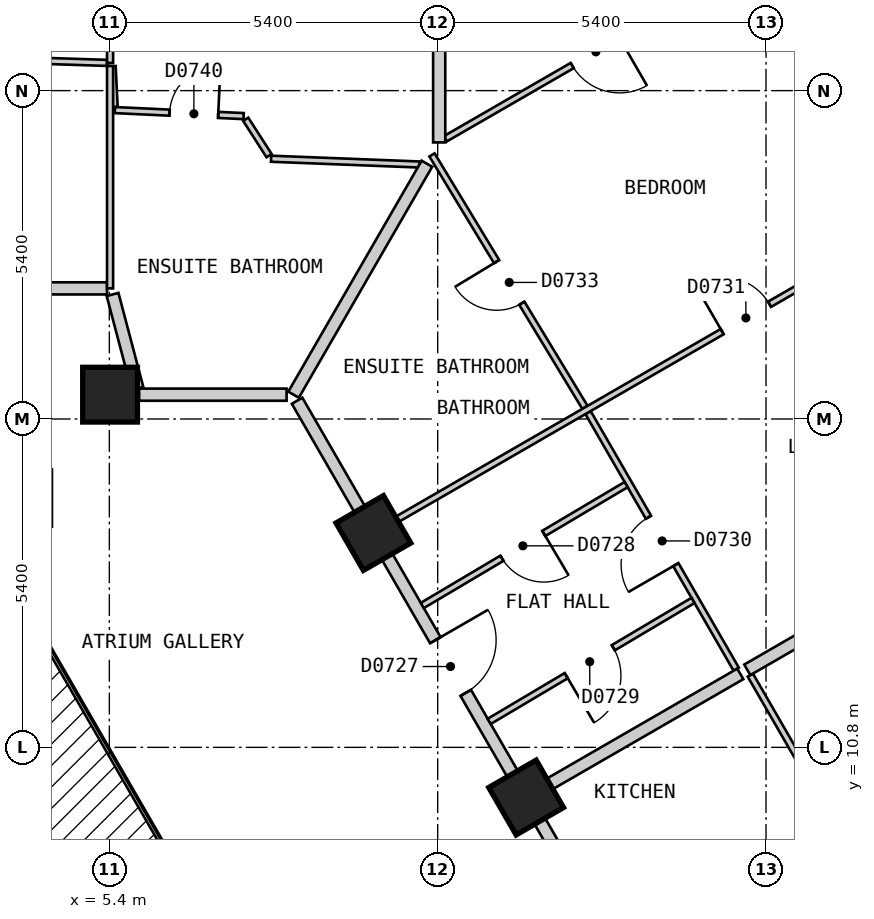
"""IFC4 building model, lengths in metres.
Left out: names, types, materials, properties, quantities, classifications, styles, units other than length and angle.
Written with IfcOpenShell. Run it as: python <this file> out.ifc"""

import sys

from ifc_helpers import new_model, si_unit, direction, frame, frame_2d, origin, origin_2d, place, context, subcontext, project, spatial, polyline, rectangle, outline, extrude, element, fill, save


model = new_model("IFC4")
c1 = context("Model", 3, precision=1e-05, world=origin(), true_north=direction((0.0, 1.0)))
c2 = subcontext(c1, "Body", "Model", "MODEL_VIEW")
j1 = project(units=[si_unit("LENGTHUNIT", "METRE"), si_unit("PLANEANGLEUNIT", "RADIAN")], contexts=[c1])
p1 = place(None, origin())
s1 = spatial("IfcSite", under=j1, at=p1, CompositionType="ELEMENT")
p2 = place(p1, origin())
s2 = spatial("IfcBuilding", under=s1, at=p2, CompositionType="ELEMENT")
p3 = place(p2, frame((0.0, 0.0, 93.0)))
s3 = spatial("IfcBuildingStorey", under=s2, at=p3, CompositionType="ELEMENT", Elevation=93.0)
for number, where, z_axis, x_axis in (
    (1, (12.255, 9.975, 0.0), (0.0, 0.0, 1.0), (-0.5, 0.866, 0.0)),
    (2, (9.743, 14.325, 0.0), (0.0, 0.0, 1.0), (-0.5, 0.866, 0.0)),
    (3, (5.412, 16.6, 0.0), (0.0, 0.0, 1.0), (-1.0, 0.0, 0.0)),
):
    element("IfcColumn", number, at=place(p3, frame(where, z_axis=z_axis, x_axis=x_axis)), inside=s3, PredefinedType="COLUMN", context=c2, shape_type="SweptSolid", body=[
        extrude(rectangle(XDim=0.9, YDim=0.9, at=origin_2d()), origin(), (0.0, 0.0, 1.0), 3.0),
    ])
p4 = place(p3, frame((29.027, 1.425, 0.0), z_axis=(0.0, 0.0, 1.0), x_axis=(-0.500027479704, 0.866009537788, 0.0)))
e4 = element("IfcWall", 4, at=p4, inside=s3, PredefinedType="SOLIDWALL", context=c2, shape_type="SweptSolid", body=[
    extrude(outline(polyline([(0.0, -0.15), (26.559, -0.15), (26.478, 0.15), (0.08, 0.15), (0.0, -0.15)])), origin(), (0.0, 0.0, 1.0), 2.7),
])
p5 = place(p4, frame((1.227, 0.0, 0.15)))
e5 = element("IfcOpeningElement", 5, at=p5, cuts=e4, PredefinedType="OPENING", context=c2, shape_type="SweptSolid", body=[
    extrude(rectangle(XDim=1.5, YDim=2.1, at=frame_2d((0.75, 1.05))), frame((0.0, 0.16, 0.0), z_axis=(0.0, -1.0, 0.0), x_axis=(1.0, 0.0, 0.0)), (0.0, 0.0, 1.0), 0.32),
])
p6 = place(p4, frame((3.738, 0.0, 0.15)))
e6 = element("IfcOpeningElement", 6, at=p6, cuts=e4, PredefinedType="OPENING", context=c2, shape_type="SweptSolid", body=[
    extrude(rectangle(XDim=1.5, YDim=2.1, at=frame_2d((0.75, 1.05))), frame((0.0, 0.16, 0.0), z_axis=(0.0, -1.0, 0.0), x_axis=(1.0, 0.0, 0.0)), (0.0, 0.0, 1.0), 0.32),
])
p7 = place(p4, frame((6.25, 0.0, 0.15)))
e7 = element("IfcOpeningElement", 7, at=p7, cuts=e4, PredefinedType="OPENING", context=c2, shape_type="SweptSolid", body=[
    extrude(rectangle(XDim=1.5, YDim=2.1, at=frame_2d((0.75, 1.05))), frame((0.0, 0.16, 0.0), z_axis=(0.0, -1.0, 0.0), x_axis=(1.0, 0.0, 0.0)), (0.0, 0.0, 1.0), 0.32),
])
p8 = place(p4, frame((8.761, 0.0, 0.15)))
e8 = element("IfcOpeningElement", 8, at=p8, cuts=e4, PredefinedType="OPENING", context=c2, shape_type="SweptSolid", body=[
    extrude(rectangle(XDim=1.5, YDim=2.1, at=frame_2d((0.75, 1.05))), frame((0.0, 0.16, 0.0), z_axis=(0.0, -1.0, 0.0), x_axis=(1.0, 0.0, 0.0)), (0.0, 0.0, 1.0), 0.32),
])
p9 = place(p4, frame((11.273, 0.0, 0.15)))
e9 = element("IfcOpeningElement", 9, at=p9, cuts=e4, PredefinedType="OPENING", context=c2, shape_type="SweptSolid", body=[
    extrude(rectangle(XDim=1.5, YDim=2.1, at=frame_2d((0.75, 1.05))), frame((0.0, 0.16, 0.0), z_axis=(0.0, -1.0, 0.0), x_axis=(1.0, 0.0, 0.0)), (0.0, 0.0, 1.0), 0.32),
])
p10 = place(p4, frame((13.785, 0.0, 0.15)))
e10 = element("IfcOpeningElement", 10, at=p10, cuts=e4, PredefinedType="OPENING", context=c2, shape_type="SweptSolid", body=[
    extrude(rectangle(XDim=1.5, YDim=2.1, at=frame_2d((0.75, 1.05))), frame((0.0, 0.16, 0.0), z_axis=(0.0, -1.0, 0.0), x_axis=(1.0, 0.0, 0.0)), (0.0, 0.0, 1.0), 0.32),
])
p11 = place(p4, frame((16.296, 0.0, 0.15)))
e11 = element("IfcOpeningElement", 11, at=p11, cuts=e4, PredefinedType="OPENING", context=c2, shape_type="SweptSolid", body=[
    extrude(rectangle(XDim=1.5, YDim=2.1, at=frame_2d((0.75, 1.05))), frame((0.0, 0.16, 0.0), z_axis=(0.0, -1.0, 0.0), x_axis=(1.0, 0.0, 0.0)), (0.0, 0.0, 1.0), 0.32),
])
p12 = place(p4, frame((18.807, 0.0, 0.15)))
e12 = element("IfcOpeningElement", 12, at=p12, cuts=e4, PredefinedType="OPENING", context=c2, shape_type="SweptSolid", body=[
    extrude(rectangle(XDim=1.5, YDim=2.1, at=frame_2d((0.75, 1.05))), frame((0.0, 0.16, 0.0), z_axis=(0.0, -1.0, 0.0), x_axis=(1.0, 0.0, 0.0)), (0.0, 0.0, 1.0), 0.32),
])
p13 = place(p4, frame((21.319, 0.0, 0.15)))
e13 = element("IfcOpeningElement", 13, at=p13, cuts=e4, PredefinedType="OPENING", context=c2, shape_type="SweptSolid", body=[
    extrude(rectangle(XDim=1.5, YDim=2.1, at=frame_2d((0.75, 1.05))), frame((0.0, 0.16, 0.0), z_axis=(0.0, -1.0, 0.0), x_axis=(1.0, 0.0, 0.0)), (0.0, 0.0, 1.0), 0.32),
])
p14 = place(p4, frame((23.831, 0.0, 0.15)))
e14 = element("IfcOpeningElement", 14, at=p14, cuts=e4, PredefinedType="OPENING", context=c2, shape_type="SweptSolid", body=[
    extrude(rectangle(XDim=1.5, YDim=2.1, at=frame_2d((0.75, 1.05))), frame((0.0, 0.16, 0.0), z_axis=(0.0, -1.0, 0.0), x_axis=(1.0, 0.0, 0.0)), (0.0, 0.0, 1.0), 0.32),
])
p15 = place(p3, frame((5.453, 18.248, 0.0), z_axis=(0.0, 0.0, 1.0), x_axis=(0.255687088482, -0.9667595941, 0.0)))
e15 = element("IfcWall", 15, at=p15, inside=s3, PredefinedType="PARTITIONING", context=c2, shape_type="SweptSolid", body=[
    extrude(rectangle(XDim=1.6, YDim=0.2, at=frame_2d((0.8, 0.0))), origin(), (0.0, 0.0, 1.0), 2.7),
])
p16 = place(p3, frame((8.488, 16.5, 0.0), z_axis=(0.0, 0.0, 1.0), x_axis=(0.499986836607, -0.86603300354, 0.0)))
e16 = element("IfcWall", 16, at=p16, inside=s3, PredefinedType="PARTITIONING", context=c2, shape_type="SweptSolid", body=[
    extrude(rectangle(XDim=20.09, YDim=0.2, at=frame_2d((10.045, 0.0))), origin(), (0.0, 0.0, 1.0), 2.7),
])
p17 = place(p16, frame((14.569, 0.0, 0.0)))
e17 = element("IfcOpeningElement", 17, at=p17, cuts=e16, PredefinedType="OPENING", context=c2, shape_type="SweptSolid", body=[
    extrude(rectangle(XDim=1.0, YDim=2.1, at=frame_2d((0.5, 1.05))), frame((0.0, 0.11, 0.0), z_axis=(0.0, -1.0, 0.0), x_axis=(1.0, 0.0, 0.0)), (0.0, 0.0, 1.0), 0.22),
])
p18 = place(p16, frame((4.547, 0.0, 0.0)))
e18 = element("IfcOpeningElement", 18, at=p18, cuts=e16, PredefinedType="OPENING", context=c2, shape_type="SweptSolid", body=[
    extrude(rectangle(XDim=1.0, YDim=2.1, at=frame_2d((0.5, 1.05))), frame((0.0, 0.11, 0.0), z_axis=(0.0, -1.0, 0.0), x_axis=(1.0, 0.0, 0.0)), (0.0, 0.0, 1.0), 0.22),
])
p19 = place(p3, frame((5.889, 16.6, 0.0), z_axis=(0.0, 0.0, 1.0), x_axis=(1.0, 0.0, 0.0)))
e19 = element("IfcWall", 19, at=p19, inside=s3, PredefinedType="PARTITIONING", context=c2, shape_type="SweptSolid", body=[
    extrude(rectangle(XDim=2.426, YDim=0.2, at=frame_2d((1.213, 0.0))), origin(), (0.0, 0.0, 1.0), 2.7),
])
p20 = place(p3, frame((1.75, 18.348, 0.0), z_axis=(0.0, 0.0, 1.0), x_axis=(1.0, 0.0, 0.0)))
e20 = element("IfcWall", 20, at=p20, inside=s3, PredefinedType="PARTITIONING", context=c2, shape_type="SweptSolid", body=[
    extrude(rectangle(XDim=3.612, YDim=0.2, at=frame_2d((1.806, 0.0))), origin(), (0.0, 0.0, 1.0), 2.7),
])
p21 = place(p3, frame((7.643, 21.129, 0.0), z_axis=(0.0, 0.0, 1.0), x_axis=(0.540427628168, -0.841390503104, 0.0)))
e21 = element("IfcWall", 21, at=p21, inside=s3, PredefinedType="PARTITIONING", context=c2, shape_type="SweptSolid", body=[
    extrude(rectangle(XDim=0.711, YDim=0.1, at=frame_2d((0.355, 0.0))), origin(), (0.0, 0.0, 1.0), 2.7),
])
p22 = place(p3, frame((10.706, 20.543, 0.0), z_axis=(0.0, 0.0, 1.0), x_axis=(0.518240414093, -0.855234981278, 0.0)))
e22 = element("IfcWall", 22, at=p22, inside=s3, PredefinedType="PARTITIONING", context=c2, shape_type="SweptSolid", body=[
    extrude(rectangle(XDim=4.855, YDim=0.1, at=frame_2d((2.427, 0.0))), origin(), (0.0, 0.0, 1.0), 2.7),
])
p23 = place(p22, frame((2.052, 0.0, 0.0)))
e23 = element("IfcOpeningElement", 23, at=p23, cuts=e22, PredefinedType="OPENING", context=c2, shape_type="SweptSolid", body=[
    extrude(rectangle(XDim=0.8, YDim=2.1, at=frame_2d((0.4, 1.05))), frame((0.0, 0.06, 0.0), z_axis=(0.0, -1.0, 0.0), x_axis=(1.0, 0.0, 0.0)), (0.0, 0.0, 1.0), 0.12),
])
p24 = place(p3, frame((13.273, 16.305, 0.0), z_axis=(0.0, 0.0, 1.0), x_axis=(0.500093956194, -0.865971151354, 0.0)))
e24 = element("IfcWall", 24, at=p24, inside=s3, PredefinedType="PARTITIONING", context=c2, shape_type="SweptSolid", body=[
    extrude(rectangle(XDim=4.873, YDim=0.1, at=frame_2d((2.437, 0.0))), origin(), (0.0, 0.0, 1.0), 2.7),
])
p25 = place(p24, frame((1.987, 0.0, 0.0)))
e25 = element("IfcOpeningElement", 25, at=p25, cuts=e24, PredefinedType="OPENING", context=c2, shape_type="SweptSolid", body=[
    extrude(rectangle(XDim=0.9, YDim=2.1, at=frame_2d((0.45, 1.05))), frame((0.0, 0.06, 0.0), z_axis=(0.0, -1.0, 0.0), x_axis=(1.0, 0.0, 0.0)), (0.0, 0.0, 1.0), 0.12),
])
p26 = place(p3, frame((15.942, 11.988, 0.0), z_axis=(0.0, 0.0, 1.0), x_axis=(0.499995794706, -0.866027831699, 0.0)))
e26 = element("IfcWall", 26, at=p26, inside=s3, PredefinedType="PARTITIONING", context=c2, shape_type="SweptSolid", body=[
    extrude(rectangle(XDim=4.922, YDim=0.1, at=frame_2d((2.461, 0.0))), origin(), (0.0, 0.0, 1.0), 2.7),
])
p27 = place(p3, frame((5.454, 22.002, 0.0), z_axis=(0.0, 0.0, 1.0), x_axis=(0.048996315227, -0.998798959298, 0.0)))
e27 = element("IfcWall", 27, at=p27, inside=s3, PredefinedType="PARTITIONING", context=c2, shape_type="SweptSolid", body=[
    extrude(rectangle(XDim=0.673, YDim=0.1, at=frame_2d((0.336, 0.0))), origin(), (0.0, 0.0, 1.0), 2.7),
])
p28 = place(p3, frame((5.412, 22.005, 0.0), z_axis=(0.0, 0.0, 1.0), x_axis=(0.0, -1.0, 0.0)))
e28 = element("IfcWall", 28, at=p28, inside=s3, PredefinedType="PARTITIONING", context=c2, shape_type="SweptSolid", body=[
    extrude(rectangle(XDim=3.657, YDim=0.1, at=frame_2d((1.829, 0.0))), origin(), (0.0, 0.0, 1.0), 2.7),
])
p29 = place(p3, frame((8.06, 20.48, 0.0), z_axis=(0.0, 0.0, 1.0), x_axis=(0.999243345912, -0.038893902497, 0.0)))
e29 = element("IfcWall", 29, at=p29, inside=s3, PredefinedType="PARTITIONING", context=c2, shape_type="SweptSolid", body=[
    extrude(rectangle(XDim=2.442, YDim=0.1, at=frame_2d((1.221, 0.0))), origin(), (0.0, 0.0, 1.0), 2.7),
])
p30 = place(p3, frame((0.049, 22.228, 0.0), z_axis=(0.0, 0.0, 1.0), x_axis=(0.99947566488, -0.032378933174, 0.0)))
e30 = element("IfcWall", 30, at=p30, inside=s3, PredefinedType="PARTITIONING", context=c2, shape_type="SweptSolid", body=[
    extrude(rectangle(XDim=5.316, YDim=0.1, at=frame_2d((2.658, 0.0))), origin(), (0.0, 0.0, 1.0), 2.7),
])
p31 = place(p3, frame((5.49, 21.28, 0.0), z_axis=(0.0, 0.0, 1.0), x_axis=(0.998907627838, -0.046728482187, 0.0)))
e31 = element("IfcWall", 31, at=p31, inside=s3, PredefinedType="PARTITIONING", context=c2, shape_type="SweptSolid", body=[
    extrude(rectangle(XDim=2.121, YDim=0.1, at=frame_2d((1.061, 0.0))), origin(), (0.0, 0.0, 1.0), 2.7),
])
p32 = place(p31, frame((0.902, 0.0, 0.0)))
e32 = element("IfcOpeningElement", 32, at=p32, cuts=e31, PredefinedType="OPENING", context=c2, shape_type="SweptSolid", body=[
    extrude(rectangle(XDim=0.8, YDim=2.1, at=frame_2d((0.4, 1.05))), frame((0.0, 0.06, 0.0), z_axis=(0.0, -1.0, 0.0), x_axis=(1.0, 0.0, 0.0)), (0.0, 0.0, 1.0), 0.12),
])
p33 = place(p3, frame((5.412, 22.055, 0.0), z_axis=(0.0, 0.0, 1.0), x_axis=(0.0, 1.0, 0.0)))
e33 = element("IfcWall", 33, at=p33, inside=s3, PredefinedType="PARTITIONING", context=c2, shape_type="SweptSolid", body=[
    extrude(rectangle(XDim=4.645, YDim=0.1, at=frame_2d((2.323, 0.0))), origin(), (0.0, 0.0, 1.0), 2.7),
])
p34 = place(p33, frame((1.873, 0.0, 0.0)))
e34 = element("IfcOpeningElement", 34, at=p34, cuts=e33, PredefinedType="OPENING", context=c2, shape_type="SweptSolid", body=[
    extrude(rectangle(XDim=0.9, YDim=2.1, at=frame_2d((0.45, 1.05))), frame((0.0, 0.06, 0.0), z_axis=(0.0, -1.0, 0.0), x_axis=(1.0, 0.0, 0.0)), (0.0, 0.0, 1.0), 0.12),
])
p35 = place(p3, frame((14.853, 5.675, 0.0), z_axis=(0.0, 0.0, 1.0), x_axis=(0.866016855193, 0.500014806302, 0.0)))
e35 = element("IfcWall", 35, at=p35, inside=s3, PredefinedType="PARTITIONING", context=c2, shape_type="SweptSolid", body=[
    extrude(rectangle(XDim=10.0, YDim=0.1, at=frame_2d((5.0, 0.0))), origin(), (0.0, 0.0, 1.0), 2.7),
])
p36 = place(p35, frame((1.6, 0.0, 0.0)))
e36 = element("IfcOpeningElement", 36, at=p36, cuts=e35, PredefinedType="OPENING", context=c2, shape_type="SweptSolid", body=[
    extrude(rectangle(XDim=0.8, YDim=2.1, at=frame_2d((0.4, 1.05))), frame((0.0, 0.06, 0.0), z_axis=(0.0, -1.0, 0.0), x_axis=(1.0, 0.0, 0.0)), (0.0, 0.0, 1.0), 0.12),
])
p37 = place(p35, frame((6.6, 0.0, 0.0)))
e37 = element("IfcOpeningElement", 37, at=p37, cuts=e35, PredefinedType="OPENING", context=c2, shape_type="SweptSolid", body=[
    extrude(rectangle(XDim=0.9, YDim=2.1, at=frame_2d((0.45, 1.05))), frame((0.0, 0.06, 0.0), z_axis=(0.0, -1.0, 0.0), x_axis=(1.0, 0.0, 0.0)), (0.0, 0.0, 1.0), 0.12),
])
p38 = place(p3, frame((9.83, 14.375, 0.0), z_axis=(0.0, 0.0, 1.0), x_axis=(0.866016855193, 0.500014806302, 0.0)))
e38 = element("IfcWall", 38, at=p38, inside=s3, PredefinedType="PARTITIONING", context=c2, shape_type="SweptSolid", body=[
    extrude(rectangle(XDim=10.0, YDim=0.1, at=frame_2d((5.0, 0.0))), origin(), (0.0, 0.0, 1.0), 2.7),
])
p39 = place(p38, frame((6.523, 0.0, 0.0)))
e39 = element("IfcOpeningElement", 39, at=p39, cuts=e38, PredefinedType="OPENING", context=c2, shape_type="SweptSolid", body=[
    extrude(rectangle(XDim=0.9, YDim=2.1, at=frame_2d((0.45, 1.05))), frame((0.0, 0.06, 0.0), z_axis=(0.0, -1.0, 0.0), x_axis=(1.0, 0.0, 0.0)), (0.0, 0.0, 1.0), 0.12),
])
p40 = place(p3, frame((10.926, 20.808, 0.0), z_axis=(0.0, 0.0, 1.0), x_axis=(0.86600925905, 0.500027962457, 0.0)))
e40 = element("IfcWall", 40, at=p40, inside=s3, PredefinedType="PARTITIONING", context=c2, shape_type="SweptSolid", body=[
    extrude(rectangle(XDim=5.834, YDim=0.1, at=frame_2d((2.917, 0.0))), origin(), (0.0, 0.0, 1.0), 2.7),
])
p41 = place(p40, frame((2.409, 0.0, 0.0)))
e41 = element("IfcOpeningElement", 41, at=p41, cuts=e40, PredefinedType="OPENING", context=c2, shape_type="SweptSolid", body=[
    extrude(rectangle(XDim=0.9, YDim=2.1, at=frame_2d((0.45, 1.05))), frame((0.0, 0.06, 0.0), z_axis=(0.0, -1.0, 0.0), x_axis=(1.0, 0.0, 0.0)), (0.0, 0.0, 1.0), 0.12),
])
p42 = place(p3, frame((11.647, 11.227, 0.0), z_axis=(0.0, 0.0, 1.0), x_axis=(0.859997349349, 0.510298500011, 0.0)))
e42 = element("IfcWall", 42, at=p42, inside=s3, PredefinedType="PARTITIONING", context=c2, shape_type="SweptSolid", body=[
    extrude(rectangle(XDim=3.898, YDim=0.1, at=frame_2d((1.949, 0.0))), origin(), (0.0, 0.0, 1.0), 2.7),
])
p43 = place(p42, frame((1.473, 0.0, 0.0)))
e43 = element("IfcOpeningElement", 43, at=p43, cuts=e42, PredefinedType="OPENING", context=c2, shape_type="SweptSolid", body=[
    extrude(rectangle(XDim=0.9, YDim=2.1, at=frame_2d((0.45, 1.05))), frame((0.0, 0.06, 0.0), z_axis=(0.0, -1.0, 0.0), x_axis=(1.0, 0.0, 0.0)), (0.0, 0.0, 1.0), 0.12),
])
p44 = place(p3, frame((10.547, 13.133, 0.0), z_axis=(0.0, 0.0, 1.0), x_axis=(0.860090994311, 0.510140648749, 0.0)))
e44 = element("IfcWall", 44, at=p44, inside=s3, PredefinedType="PARTITIONING", context=c2, shape_type="SweptSolid", body=[
    extrude(rectangle(XDim=3.897, YDim=0.1, at=frame_2d((1.948, 0.0))), origin(), (0.0, 0.0, 1.0), 2.7),
])
p45 = place(p44, frame((1.523, 0.0, 0.0)))
e45 = element("IfcOpeningElement", 45, at=p45, cuts=e44, PredefinedType="OPENING", context=c2, shape_type="SweptSolid", body=[
    extrude(rectangle(XDim=0.8, YDim=2.1, at=frame_2d((0.4, 1.05))), frame((0.0, 0.06, 0.0), z_axis=(0.0, -1.0, 0.0), x_axis=(1.0, 0.0, 0.0)), (0.0, 0.0, 1.0), 0.12),
])
p46 = place(p3, frame((8.43, 16.6, 0.0), z_axis=(0.0, 0.0, 1.0), x_axis=(0.500072613115, 0.865983476524, 0.0)))
e46 = element("IfcWall", 46, at=p46, inside=s3, PredefinedType="PARTITIONING", context=c2, shape_type="SweptSolid", body=[
    extrude(rectangle(XDim=4.385, YDim=0.2, at=frame_2d((2.193, 0.0))), origin(), (0.0, 0.0, 1.0), 2.7),
])
p47 = place(p3, frame((10.825, 20.748, 0.0), z_axis=(0.0, 0.0, 1.0), x_axis=(0.0, 1.0, 0.0)))
e47 = element("IfcWall", 47, at=p47, inside=s3, PredefinedType="PARTITIONING", context=c2, shape_type="SweptSolid", body=[
    extrude(rectangle(XDim=5.952, YDim=0.2, at=frame_2d((2.976, 0.0))), origin(), (0.0, 0.0, 1.0), 2.7),
])
p48 = place(p3, frame((12.342, 10.025, 0.0), z_axis=(0.0, 0.0, 1.0), x_axis=(0.866033886885, 0.499985306551, 0.0)))
e48 = element("IfcWall", 48, at=p48, inside=s3, PredefinedType="PARTITIONING", context=c2, shape_type="SweptSolid", body=[
    extrude(rectangle(XDim=3.966, YDim=0.2, at=frame_2d((1.983, 0.0))), origin(), (0.0, 0.0, 1.0), 2.7),
])
p49 = place(p3, frame((15.892, 12.075, 0.0), z_axis=(0.0, 0.0, 1.0), x_axis=(0.866000883696, 0.500042467634, 0.0)))
e49 = element("IfcWall", 49, at=p49, inside=s3, PredefinedType="PARTITIONING", context=c2, shape_type="SweptSolid", body=[
    extrude(rectangle(XDim=5.899, YDim=0.2, at=frame_2d((2.95, 0.0))), origin(), (0.0, 0.0, 1.0), 2.7),
])
p50 = place(p14, origin())
e50 = element("IfcWindow", 50, at=p50, inside=s3, PartitioningType="SINGLE_PANEL", PredefinedType="WINDOW", context=c2, shape_type="SweptSolid", body=[
    extrude(rectangle(XDim=1.5, YDim=2.1, at=frame_2d((0.75, 1.05))), frame((0.0, 0.03, 0.0), z_axis=(0.0, -1.0, 0.0), x_axis=(1.0, 0.0, 0.0)), (0.0, 0.0, 1.0), 0.06),
])
fill(e14, e50)
p51 = place(p18, origin())
e51 = element("IfcDoor", 51, at=p51, inside=s3, OperationType="SINGLE_SWING_LEFT", PredefinedType="DOOR", context=c2, shape_type="SweptSolid", body=[
    extrude(rectangle(XDim=1.0, YDim=2.1, at=frame_2d((0.5, 1.05))), frame((0.0, 0.025, 0.0), z_axis=(0.0, -1.0, 0.0), x_axis=(1.0, 0.0, 0.0)), (0.0, 0.0, 1.0), 0.05),
])
fill(e18, e51)
p52 = place(p45, origin())
e52 = element("IfcDoor", 52, at=p52, inside=s3, OperationType="SINGLE_SWING_RIGHT", PredefinedType="DOOR", context=c2, shape_type="SweptSolid", body=[
    extrude(rectangle(XDim=0.8, YDim=2.1, at=frame_2d((0.4, 1.05))), frame((0.0, 0.025, 0.0), z_axis=(0.0, -1.0, 0.0), x_axis=(1.0, 0.0, 0.0)), (0.0, 0.0, 1.0), 0.05),
])
fill(e45, e52)
p53 = place(p43, origin())
e53 = element("IfcDoor", 53, at=p53, inside=s3, OperationType="SINGLE_SWING_LEFT", PredefinedType="DOOR", context=c2, shape_type="SweptSolid", body=[
    extrude(rectangle(XDim=0.9, YDim=2.1, at=frame_2d((0.45, 1.05))), frame((0.0, 0.025, 0.0), z_axis=(0.0, -1.0, 0.0), x_axis=(1.0, 0.0, 0.0)), (0.0, 0.0, 1.0), 0.05),
])
fill(e43, e53)
p54 = place(p25, origin())
e54 = element("IfcDoor", 54, at=p54, inside=s3, OperationType="SINGLE_SWING_RIGHT", PredefinedType="DOOR", context=c2, shape_type="SweptSolid", body=[
    extrude(rectangle(XDim=0.9, YDim=2.1, at=frame_2d((0.45, 1.05))), frame((0.0, 0.025, 0.0), z_axis=(0.0, -1.0, 0.0), x_axis=(1.0, 0.0, 0.0)), (0.0, 0.0, 1.0), 0.05),
])
fill(e25, e54)
p55 = place(p39, origin())
e55 = element("IfcDoor", 55, at=p55, inside=s3, OperationType="SINGLE_SWING_LEFT", PredefinedType="DOOR", context=c2, shape_type="SweptSolid", body=[
    extrude(rectangle(XDim=0.9, YDim=2.1, at=frame_2d((0.45, 1.05))), frame((0.0, 0.025, 0.0), z_axis=(0.0, -1.0, 0.0), x_axis=(1.0, 0.0, 0.0)), (0.0, 0.0, 1.0), 0.05),
])
fill(e39, e55)
p56 = place(p41, origin())
e56 = element("IfcDoor", 56, at=p56, inside=s3, OperationType="SINGLE_SWING_RIGHT", PredefinedType="DOOR", context=c2, shape_type="SweptSolid", body=[
    extrude(rectangle(XDim=0.9, YDim=2.1, at=frame_2d((0.45, 1.05))), frame((0.0, 0.025, 0.0), z_axis=(0.0, -1.0, 0.0), x_axis=(1.0, 0.0, 0.0)), (0.0, 0.0, 1.0), 0.05),
])
fill(e41, e56)
p57 = place(p23, origin())
e57 = element("IfcDoor", 57, at=p57, inside=s3, OperationType="SINGLE_SWING_LEFT", PredefinedType="DOOR", context=c2, shape_type="SweptSolid", body=[
    extrude(rectangle(XDim=0.8, YDim=2.1, at=frame_2d((0.4, 1.05))), frame((0.0, 0.025, 0.0), z_axis=(0.0, -1.0, 0.0), x_axis=(1.0, 0.0, 0.0)), (0.0, 0.0, 1.0), 0.05),
])
fill(e23, e57)
p58 = place(p32, origin())
e58 = element("IfcDoor", 58, at=p58, inside=s3, OperationType="SINGLE_SWING_RIGHT", PredefinedType="DOOR", context=c2, shape_type="SweptSolid", body=[
    extrude(rectangle(XDim=0.8, YDim=2.1, at=frame_2d((0.4, 1.05))), frame((0.0, 0.025, 0.0), z_axis=(0.0, -1.0, 0.0), x_axis=(1.0, 0.0, 0.0)), (0.0, 0.0, 1.0), 0.05),
])
fill(e32, e58)
save(model, sys.argv[1])
